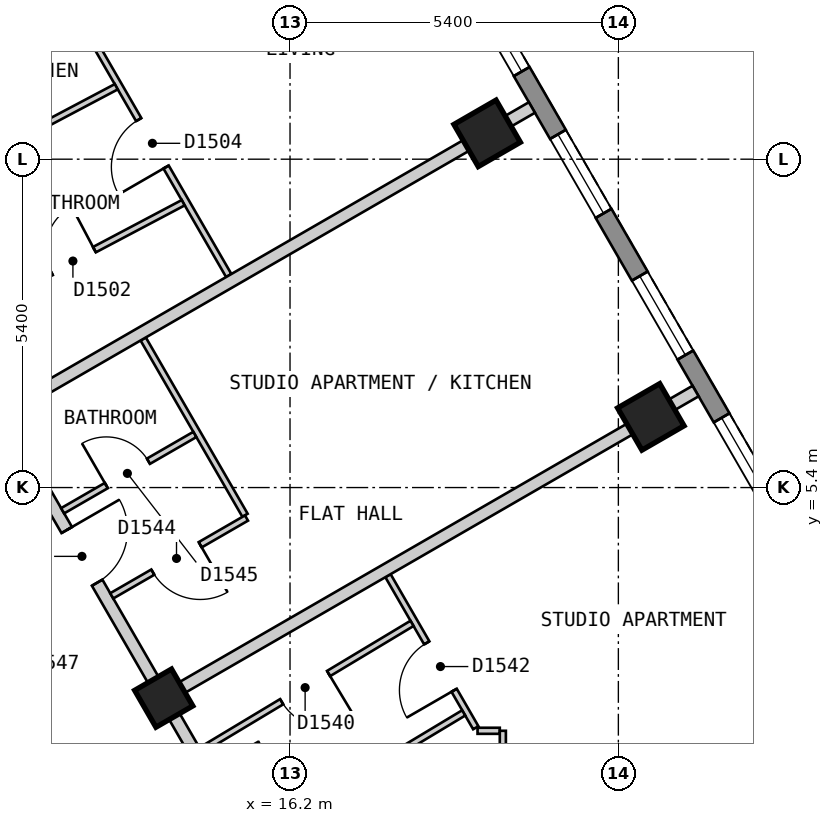
"""IFC4 building model, lengths in metres.
Left out: names, types, materials, properties, quantities, classifications, styles, units other than length and angle.
Written with IfcOpenShell. Run it as: python <this file> out.ifc"""

import sys

from ifc_helpers import new_model, si_unit, direction, frame, frame_2d, origin, origin_2d, place, context, subcontext, project, spatial, polyline, rectangle, outline, extrude, element, fill, save


model = new_model("IFC4")
c1 = context("Model", 3, precision=1e-05, world=origin(), true_north=direction((0.0, 1.0)))
c2 = subcontext(c1, "Body", "Model", "MODEL_VIEW")
j1 = project(units=[si_unit("LENGTHUNIT", "METRE"), si_unit("PLANEANGLEUNIT", "RADIAN")], contexts=[c1])
p1 = place(None, origin())
s1 = spatial("IfcSite", under=j1, at=p1, CompositionType="ELEMENT")
p2 = place(p1, origin())
s2 = spatial("IfcBuilding", under=s1, at=p2, CompositionType="ELEMENT")
p3 = place(p2, frame((0.0, 0.0, 190.2)))
s3 = spatial("IfcBuildingStorey", under=s2, at=p3, CompositionType="ELEMENT", Elevation=190.2)
for number, where, z_axis, x_axis in (
    (1, (22.134, 6.562, 0.0), (0.0, 0.0, 1.0), (-0.5, 0.866, 0.0)),
    (2, (19.442, 11.225, 0.0), (0.0, 0.0, 1.0), (-0.5, 0.866, 0.0)),
):
    element("IfcColumn", number, at=place(p3, frame(where, z_axis=z_axis, x_axis=x_axis)), inside=s3, PredefinedType="COLUMN", context=c2, shape_type="SweptSolid", body=[
        extrude(rectangle(XDim=0.8, YDim=0.8, at=origin_2d()), origin(), (0.0, 0.0, 1.0), 3.0),
    ])
p4 = place(p3, frame((14.123, 1.937, 0.0), z_axis=(0.0, 0.0, 1.0), x_axis=(-0.5, 0.866025403784, 0.0)))
e3 = element("IfcColumn", 3, at=p4, inside=s3, PredefinedType="COLUMN", context=c2, shape_type="SweptSolid", body=[
    extrude(rectangle(XDim=0.7, YDim=0.7, at=origin_2d()), origin(), (0.0, 0.0, 1.0), 3.0),
])
p5 = place(p3, frame((26.024, 1.825, 0.0), z_axis=(0.0, 0.0, 1.0), x_axis=(-0.500010537973, 0.866019319597, 0.0)))
e4 = element("IfcWall", 4, at=p5, inside=s3, PredefinedType="SOLIDWALL", context=c2, shape_type="SweptSolid", body=[
    extrude(outline(polyline([(0.0, -0.15), (22.863, -0.15), (22.783, 0.15), (0.08, 0.15), (0.0, -0.15)])), origin(), (0.0, 0.0, 1.0), 2.7),
])
p6 = place(p5, frame((1.259, 0.0, 0.15)))
e5 = element("IfcOpeningElement", 5, at=p6, cuts=e4, PredefinedType="OPENING", context=c2, shape_type="SweptSolid", body=[
    extrude(rectangle(XDim=1.5, YDim=2.1, at=frame_2d((0.75, 1.05))), frame((0.0, 0.16, 0.0), z_axis=(0.0, -1.0, 0.0), x_axis=(1.0, 0.0, 0.0)), (0.0, 0.0, 1.0), 0.32),
])
p7 = place(p5, frame((3.952, 0.0, 0.15)))
e6 = element("IfcOpeningElement", 6, at=p7, cuts=e4, PredefinedType="OPENING", context=c2, shape_type="SweptSolid", body=[
    extrude(rectangle(XDim=1.5, YDim=2.1, at=frame_2d((0.75, 1.05))), frame((0.0, 0.16, 0.0), z_axis=(0.0, -1.0, 0.0), x_axis=(1.0, 0.0, 0.0)), (0.0, 0.0, 1.0), 0.32),
])
p8 = place(p5, frame((6.644, 0.0, 0.15)))
e7 = element("IfcOpeningElement", 7, at=p8, cuts=e4, PredefinedType="OPENING", context=c2, shape_type="SweptSolid", body=[
    extrude(rectangle(XDim=1.5, YDim=2.1, at=frame_2d((0.75, 1.05))), frame((0.0, 0.16, 0.0), z_axis=(0.0, -1.0, 0.0), x_axis=(1.0, 0.0, 0.0)), (0.0, 0.0, 1.0), 0.32),
])
p9 = place(p5, frame((9.335, 0.0, 0.15)))
e8 = element("IfcOpeningElement", 8, at=p9, cuts=e4, PredefinedType="OPENING", context=c2, shape_type="SweptSolid", body=[
    extrude(rectangle(XDim=1.5, YDim=2.1, at=frame_2d((0.75, 1.05))), frame((0.0, 0.16, 0.0), z_axis=(0.0, -1.0, 0.0), x_axis=(1.0, 0.0, 0.0)), (0.0, 0.0, 1.0), 0.32),
])
p10 = place(p5, frame((12.028, 0.0, 0.15)))
e9 = element("IfcOpeningElement", 9, at=p10, cuts=e4, PredefinedType="OPENING", context=c2, shape_type="SweptSolid", body=[
    extrude(rectangle(XDim=1.5, YDim=2.1, at=frame_2d((0.75, 1.05))), frame((0.0, 0.16, 0.0), z_axis=(0.0, -1.0, 0.0), x_axis=(1.0, 0.0, 0.0)), (0.0, 0.0, 1.0), 0.32),
])
p11 = place(p5, frame((14.72, 0.0, 0.15)))
e10 = element("IfcOpeningElement", 10, at=p11, cuts=e4, PredefinedType="OPENING", context=c2, shape_type="SweptSolid", body=[
    extrude(rectangle(XDim=1.5, YDim=2.1, at=frame_2d((0.75, 1.05))), frame((0.0, 0.16, 0.0), z_axis=(0.0, -1.0, 0.0), x_axis=(1.0, 0.0, 0.0)), (0.0, 0.0, 1.0), 0.32),
])
p12 = place(p5, frame((17.411, 0.0, 0.15)))
e11 = element("IfcOpeningElement", 11, at=p12, cuts=e4, PredefinedType="OPENING", context=c2, shape_type="SweptSolid", body=[
    extrude(rectangle(XDim=1.5, YDim=2.1, at=frame_2d((0.75, 1.05))), frame((0.0, 0.16, 0.0), z_axis=(0.0, -1.0, 0.0), x_axis=(1.0, 0.0, 0.0)), (0.0, 0.0, 1.0), 0.32),
])
p13 = place(p5, frame((20.104, 0.0, 0.15)))
e12 = element("IfcOpeningElement", 12, at=p13, cuts=e4, PredefinedType="OPENING", context=c2, shape_type="SweptSolid", body=[
    extrude(rectangle(XDim=1.5, YDim=2.1, at=frame_2d((0.75, 1.05))), frame((0.0, 0.16, 0.0), z_axis=(0.0, -1.0, 0.0), x_axis=(1.0, 0.0, 0.0)), (0.0, 0.0, 1.0), 0.32),
])
p14 = place(p3, frame((9.469, 5.6, 0.0), z_axis=(0.0, 0.0, 1.0), x_axis=(0.499964524401, -0.866045884662, 0.0)))
e13 = element("IfcWall", 13, at=p14, inside=s3, PredefinedType="PARTITIONING", context=c2, shape_type="SweptSolid", body=[
    extrude(rectangle(XDim=7.042, YDim=0.2, at=frame_2d((3.521, 0.0))), origin(), (0.0, 0.0, 1.0), 2.7),
])
p15 = place(p14, frame((3.129, 0.0, 0.0)))
e14 = element("IfcOpeningElement", 14, at=p15, cuts=e13, PredefinedType="OPENING", context=c2, shape_type="SweptSolid", body=[
    extrude(rectangle(XDim=0.9, YDim=2.1, at=frame_2d((0.45, 1.05))), frame((0.0, 0.11, 0.0), z_axis=(0.0, -1.0, 0.0), x_axis=(1.0, 0.0, 0.0)), (0.0, 0.0, 1.0), 0.22),
])
p16 = place(p3, frame((10.739, 7.8, 0.0), z_axis=(0.0, 0.0, 1.0), x_axis=(0.500023726918, -0.866011704609, 0.0)))
e15 = element("IfcWall", 15, at=p16, inside=s3, PredefinedType="PARTITIONING", context=c2, shape_type="SweptSolid", body=[
    extrude(rectangle(XDim=9.47, YDim=0.2, at=frame_2d((4.735, 0.0))), origin(), (0.0, 0.0, 1.0), 2.7),
])
p17 = place(p16, frame((8.168, 0.0, 0.0)))
e16 = element("IfcOpeningElement", 16, at=p17, cuts=e15, PredefinedType="OPENING", context=c2, shape_type="SweptSolid", body=[
    extrude(rectangle(XDim=1.0, YDim=2.1, at=frame_2d((0.5, 1.05))), frame((0.0, 0.11, 0.0), z_axis=(0.0, -1.0, 0.0), x_axis=(1.0, 0.0, 0.0)), (0.0, 0.0, 1.0), 0.22),
])
p18 = place(p16, frame((3.578, 0.0, 0.0)))
e17 = element("IfcOpeningElement", 17, at=p18, cuts=e15, PredefinedType="OPENING", context=c2, shape_type="SweptSolid", body=[
    extrude(rectangle(XDim=1.0, YDim=2.1, at=frame_2d((0.5, 1.05))), frame((0.0, 0.11, 0.0), z_axis=(0.0, -1.0, 0.0), x_axis=(1.0, 0.0, 0.0)), (0.0, 0.0, 1.0), 0.22),
])
p19 = place(p3, frame((13.785, 7.844, 0.0), z_axis=(0.0, 0.0, 1.0), x_axis=(0.500176784828, -0.865923312955, 0.0)))
e18 = element("IfcWall", 18, at=p19, inside=s3, PredefinedType="PARTITIONING", context=c2, shape_type="SweptSolid", body=[
    extrude(rectangle(XDim=3.349, YDim=0.1, at=frame_2d((1.674, 0.0))), origin(), (0.0, 0.0, 1.0), 2.7),
])
p20 = place(p3, frame((17.811, 3.951, 0.0), z_axis=(0.0, 0.0, 1.0), x_axis=(0.499976149225, -0.866039173598, 0.0)))
e19 = element("IfcWall", 19, at=p20, inside=s3, PredefinedType="PARTITIONING", context=c2, shape_type="SweptSolid", body=[
    extrude(rectangle(XDim=2.888, YDim=0.1, at=frame_2d((1.444, 0.0))), origin(), (0.0, 0.0, 1.0), 2.7),
])
p21 = place(p20, frame((1.276, 0.0, 0.0)))
e20 = element("IfcOpeningElement", 20, at=p21, cuts=e19, PredefinedType="OPENING", context=c2, shape_type="SweptSolid", body=[
    extrude(rectangle(XDim=0.9, YDim=2.1, at=frame_2d((0.45, 1.05))), frame((0.0, 0.06, 0.0), z_axis=(0.0, -1.0, 0.0), x_axis=(1.0, 0.0, 0.0)), (0.0, 0.0, 1.0), 0.12),
])
p22 = place(p3, frame((9.883, 18.082, 0.0), z_axis=(0.0, 0.0, 1.0), x_axis=(0.500004428835, -0.86602284678, 0.0)))
e21 = element("IfcWall", 21, at=p22, inside=s3, PredefinedType="PARTITIONING", context=c2, shape_type="SweptSolid", body=[
    extrude(rectangle(XDim=10.618, YDim=0.1, at=frame_2d((5.309, 0.0))), origin(), (0.0, 0.0, 1.0), 2.7),
])
p23 = place(p22, frame((7.657, 0.0, 0.0)))
e22 = element("IfcOpeningElement", 22, at=p23, cuts=e21, PredefinedType="OPENING", context=c2, shape_type="SweptSolid", body=[
    extrude(rectangle(XDim=0.9, YDim=2.1, at=frame_2d((0.45, 1.05))), frame((0.0, 0.06, 0.0), z_axis=(0.0, -1.0, 0.0), x_axis=(1.0, 0.0, 0.0)), (0.0, 0.0, 1.0), 0.12),
])
p24 = place(p22, frame((2.242, 0.0, 0.0)))
e23 = element("IfcOpeningElement", 23, at=p24, cuts=e21, PredefinedType="OPENING", context=c2, shape_type="SweptSolid", body=[
    extrude(rectangle(XDim=0.8, YDim=2.1, at=frame_2d((0.4, 1.05))), frame((0.0, 0.06, 0.0), z_axis=(0.0, -1.0, 0.0), x_axis=(1.0, 0.0, 0.0)), (0.0, 0.0, 1.0), 0.12),
])
p25 = place(p3, frame((19.284, 1.4, 0.0), z_axis=(0.0, 0.0, 1.0), x_axis=(1.0, 0.0, 0.0)))
e24 = element("IfcWall", 24, at=p25, inside=s3, PredefinedType="PARTITIONING", context=c2, shape_type="SweptSolid", body=[
    extrude(rectangle(XDim=0.366, YDim=0.1, at=frame_2d((0.183, 0.0))), origin(), (0.0, 0.0, 1.0), 2.7),
])
p26 = place(p3, frame((19.7, 0.679, 0.0), z_axis=(0.0, 0.0, 1.0), x_axis=(0.0, 1.0, 0.0)))
e25 = element("IfcWall", 25, at=p26, inside=s3, PredefinedType="PARTITIONING", context=c2, shape_type="SweptSolid", body=[
    extrude(rectangle(XDim=0.721, YDim=0.1, at=frame_2d((0.36, 0.0))), origin(), (0.0, 0.0, 1.0), 2.7),
])
p27 = place(p3, frame((9.76, 10.096, 0.0), z_axis=(0.0, 0.0, 1.0), x_axis=(0.883925629136, 0.467627503636, 0.0)))
e26 = element("IfcWall", 26, at=p27, inside=s3, PredefinedType="PARTITIONING", context=c2, shape_type="SweptSolid", body=[
    extrude(rectangle(XDim=4.052, YDim=0.1, at=frame_2d((2.026, 0.0))), origin(), (0.0, 0.0, 1.0), 2.7),
])
p28 = place(p27, frame((1.551, 0.0, 0.0)))
e27 = element("IfcOpeningElement", 27, at=p28, cuts=e26, PredefinedType="OPENING", context=c2, shape_type="SweptSolid", body=[
    extrude(rectangle(XDim=0.9, YDim=2.1, at=frame_2d((0.45, 1.05))), frame((0.0, 0.06, 0.0), z_axis=(0.0, -1.0, 0.0), x_axis=(1.0, 0.0, 0.0)), (0.0, 0.0, 1.0), 0.12),
])
p29 = place(p3, frame((10.772, 8.143, 0.0), z_axis=(0.0, 0.0, 1.0), x_axis=(0.884049480227, 0.467393320995, 0.0)))
e28 = element("IfcWall", 28, at=p29, inside=s3, PredefinedType="PARTITIONING", context=c2, shape_type="SweptSolid", body=[
    extrude(rectangle(XDim=4.153, YDim=0.1, at=frame_2d((2.076, 0.0))), origin(), (0.0, 0.0, 1.0), 2.7),
])
p30 = place(p29, frame((1.701, 0.0, 0.0)))
e29 = element("IfcOpeningElement", 29, at=p30, cuts=e28, PredefinedType="OPENING", context=c2, shape_type="SweptSolid", body=[
    extrude(rectangle(XDim=0.8, YDim=2.1, at=frame_2d((0.4, 1.05))), frame((0.0, 0.06, 0.0), z_axis=(0.0, -1.0, 0.0), x_axis=(1.0, 0.0, 0.0)), (0.0, 0.0, 1.0), 0.12),
])
p31 = place(p3, frame((13.268, 3.619, 0.0), z_axis=(0.0, 0.0, 1.0), x_axis=(0.865902724456, 0.500212426655, 0.0)))
e30 = element("IfcWall", 30, at=p31, inside=s3, PredefinedType="PARTITIONING", context=c2, shape_type="SweptSolid", body=[
    extrude(rectangle(XDim=2.559, YDim=0.1, at=frame_2d((1.28, 0.0))), origin(), (0.0, 0.0, 1.0), 2.7),
])
p32 = place(p31, frame((0.78, 0.0, 0.0)))
e31 = element("IfcOpeningElement", 31, at=p32, cuts=e30, PredefinedType="OPENING", context=c2, shape_type="SweptSolid", body=[
    extrude(rectangle(XDim=0.9, YDim=2.1, at=frame_2d((0.45, 1.05))), frame((0.0, 0.06, 0.0), z_axis=(0.0, -1.0, 0.0), x_axis=(1.0, 0.0, 0.0)), (0.0, 0.0, 1.0), 0.12),
])
p33 = place(p3, frame((12.46, 5.018, 0.0), z_axis=(0.0, 0.0, 1.0), x_axis=(0.866080321209, 0.499904868165, 0.0)))
e32 = element("IfcWall", 32, at=p33, inside=s3, PredefinedType="PARTITIONING", context=c2, shape_type="SweptSolid", body=[
    extrude(rectangle(XDim=2.51, YDim=0.1, at=frame_2d((1.255, 0.0))), origin(), (0.0, 0.0, 1.0), 2.7),
])
p34 = place(p33, frame((0.83, 0.0, 0.0)))
e33 = element("IfcOpeningElement", 33, at=p34, cuts=e32, PredefinedType="OPENING", context=c2, shape_type="SweptSolid", body=[
    extrude(rectangle(XDim=0.8, YDim=2.1, at=frame_2d((0.4, 1.05))), frame((0.0, 0.06, 0.0), z_axis=(0.0, -1.0, 0.0), x_axis=(1.0, 0.0, 0.0)), (0.0, 0.0, 1.0), 0.12),
])
p35 = place(p3, frame((8.999, 11.413, 0.0), z_axis=(0.0, 0.0, 1.0), x_axis=(0.86606561423, 0.499930346997, 0.0)))
e34 = element("IfcWall", 34, at=p35, inside=s3, PredefinedType="PARTITIONING", context=c2, shape_type="SweptSolid", body=[
    extrude(rectangle(XDim=4.1, YDim=0.1, at=frame_2d((2.05, 0.0))), origin(), (0.0, 0.0, 1.0), 2.7),
])
p36 = place(p3, frame((14.734, 1.08, 0.0), z_axis=(0.0, 0.0, 1.0), x_axis=(0.857205608004, 0.514974315482, 0.0)))
e35 = element("IfcWall", 35, at=p36, inside=s3, PredefinedType="PARTITIONING", context=c2, shape_type="SweptSolid", body=[
    extrude(rectangle(XDim=4.051, YDim=0.1, at=frame_2d((2.025, 0.0))), origin(), (0.0, 0.0, 1.0), 2.7),
])
p37 = place(p36, frame((1.55, 0.0, 0.0)))
e36 = element("IfcOpeningElement", 36, at=p37, cuts=e35, PredefinedType="OPENING", context=c2, shape_type="SweptSolid", body=[
    extrude(rectangle(XDim=0.9, YDim=2.1, at=frame_2d((0.45, 1.05))), frame((0.0, 0.06, 0.0), z_axis=(0.0, -1.0, 0.0), x_axis=(1.0, 0.0, 0.0)), (0.0, 0.0, 1.0), 0.12),
])
p38 = place(p3, frame((15.499, -0.444, 0.0), z_axis=(0.0, 0.0, 1.0), x_axis=(0.857061798163, 0.515213619899, 0.0)))
e37 = element("IfcWall", 37, at=p38, inside=s3, PredefinedType="PARTITIONING", context=c2, shape_type="SweptSolid", body=[
    extrude(rectangle(XDim=4.15, YDim=0.1, at=frame_2d((2.075, 0.0))), origin(), (0.0, 0.0, 1.0), 2.7),
])
p39 = place(p38, frame((1.7, 0.0, 0.0)))
e38 = element("IfcOpeningElement", 38, at=p39, cuts=e37, PredefinedType="OPENING", context=c2, shape_type="SweptSolid", body=[
    extrude(rectangle(XDim=0.8, YDim=2.1, at=frame_2d((0.4, 1.05))), frame((0.0, 0.06, 0.0), z_axis=(0.0, -1.0, 0.0), x_axis=(1.0, 0.0, 0.0)), (0.0, 0.0, 1.0), 0.12),
])
p40 = place(p3, frame((14.21, 1.987, 0.0), z_axis=(0.0, 0.0, 1.0), x_axis=(0.866022959057, 0.500004234368, 0.0)))
e39 = element("IfcWall", 39, at=p40, inside=s3, PredefinedType="PARTITIONING", context=c2, shape_type="SweptSolid", body=[
    extrude(rectangle(XDim=10.0, YDim=0.2, at=frame_2d((5.0, 0.0))), origin(), (0.0, 0.0, 1.0), 2.7),
])
p41 = place(p3, frame((11.518, 6.65, 0.0), z_axis=(0.0, 0.0, 1.0), x_axis=(0.866016855193, 0.500014806302, 0.0)))
e40 = element("IfcWall", 40, at=p41, inside=s3, PredefinedType="PARTITIONING", context=c2, shape_type="SweptSolid", body=[
    extrude(rectangle(XDim=10.0, YDim=0.2, at=frame_2d((5.0, 0.0))), origin(), (0.0, 0.0, 1.0), 2.7),
])
p42 = place(p7, origin())
e41 = element("IfcWindow", 41, at=p42, inside=s3, PartitioningType="SINGLE_PANEL", PredefinedType="WINDOW", context=c2, shape_type="SweptSolid", body=[
    extrude(rectangle(XDim=1.5, YDim=2.1, at=frame_2d((0.75, 1.05))), frame((0.0, 0.03, 0.0), z_axis=(0.0, -1.0, 0.0), x_axis=(1.0, 0.0, 0.0)), (0.0, 0.0, 1.0), 0.06),
])
fill(e6, e41)
p43 = place(p8, origin())
e42 = element("IfcWindow", 42, at=p43, inside=s3, PartitioningType="SINGLE_PANEL", PredefinedType="WINDOW", context=c2, shape_type="SweptSolid", body=[
    extrude(rectangle(XDim=1.5, YDim=2.1, at=frame_2d((0.75, 1.05))), frame((0.0, 0.03, 0.0), z_axis=(0.0, -1.0, 0.0), x_axis=(1.0, 0.0, 0.0)), (0.0, 0.0, 1.0), 0.06),
])
fill(e7, e42)
p44 = place(p9, origin())
e43 = element("IfcWindow", 43, at=p44, inside=s3, PartitioningType="SINGLE_PANEL", PredefinedType="WINDOW", context=c2, shape_type="SweptSolid", body=[
    extrude(rectangle(XDim=1.5, YDim=2.1, at=frame_2d((0.75, 1.05))), frame((0.0, 0.03, 0.0), z_axis=(0.0, -1.0, 0.0), x_axis=(1.0, 0.0, 0.0)), (0.0, 0.0, 1.0), 0.06),
])
fill(e8, e43)
p45 = place(p10, origin())
e44 = element("IfcWindow", 44, at=p45, inside=s3, PartitioningType="SINGLE_PANEL", PredefinedType="WINDOW", context=c2, shape_type="SweptSolid", body=[
    extrude(rectangle(XDim=1.5, YDim=2.1, at=frame_2d((0.75, 1.05))), frame((0.0, 0.03, 0.0), z_axis=(0.0, -1.0, 0.0), x_axis=(1.0, 0.0, 0.0)), (0.0, 0.0, 1.0), 0.06),
])
fill(e9, e44)
p46 = place(p30, origin())
e45 = element("IfcDoor", 45, at=p46, inside=s3, OperationType="SINGLE_SWING_RIGHT", PredefinedType="DOOR", context=c2, shape_type="SweptSolid", body=[
    extrude(rectangle(XDim=0.8, YDim=2.1, at=frame_2d((0.4, 1.05))), frame((0.0, 0.025, 0.0), z_axis=(0.0, -1.0, 0.0), x_axis=(1.0, 0.0, 0.0)), (0.0, 0.0, 1.0), 0.05),
])
fill(e29, e45)
p47 = place(p23, origin())
e46 = element("IfcDoor", 46, at=p47, inside=s3, OperationType="SINGLE_SWING_RIGHT", PredefinedType="DOOR", context=c2, shape_type="SweptSolid", body=[
    extrude(rectangle(XDim=0.9, YDim=2.1, at=frame_2d((0.45, 1.05))), frame((0.0, 0.025, 0.0), z_axis=(0.0, -1.0, 0.0), x_axis=(1.0, 0.0, 0.0)), (0.0, 0.0, 1.0), 0.05),
])
fill(e22, e46)
p48 = place(p37, origin())
e47 = element("IfcDoor", 47, at=p48, inside=s3, OperationType="SINGLE_SWING_RIGHT", PredefinedType="DOOR", context=c2, shape_type="SweptSolid", body=[
    extrude(rectangle(XDim=0.9, YDim=2.1, at=frame_2d((0.45, 1.05))), frame((0.0, 0.025, 0.0), z_axis=(0.0, -1.0, 0.0), x_axis=(1.0, 0.0, 0.0)), (0.0, 0.0, 1.0), 0.05),
])
fill(e36, e47)
p49 = place(p21, origin())
e48 = element("IfcDoor", 48, at=p49, inside=s3, OperationType="SINGLE_SWING_RIGHT", PredefinedType="DOOR", context=c2, shape_type="SweptSolid", body=[
    extrude(rectangle(XDim=0.9, YDim=2.1, at=frame_2d((0.45, 1.05))), frame((0.0, 0.025, 0.0), z_axis=(0.0, -1.0, 0.0), x_axis=(1.0, 0.0, 0.0)), (0.0, 0.0, 1.0), 0.05),
])
fill(e20, e48)
p50 = place(p18, origin())
e49 = element("IfcDoor", 49, at=p50, inside=s3, OperationType="SINGLE_SWING_LEFT", PredefinedType="DOOR", context=c2, shape_type="SweptSolid", body=[
    extrude(rectangle(XDim=1.0, YDim=2.1, at=frame_2d((0.5, 1.05))), frame((0.0, 0.025, 0.0), z_axis=(0.0, -1.0, 0.0), x_axis=(1.0, 0.0, 0.0)), (0.0, 0.0, 1.0), 0.05),
])
fill(e17, e49)
p51 = place(p32, origin())
e50 = element("IfcDoor", 50, at=p51, inside=s3, OperationType="SINGLE_SWING_RIGHT", PredefinedType="DOOR", context=c2, shape_type="SweptSolid", body=[
    extrude(rectangle(XDim=0.9, YDim=2.1, at=frame_2d((0.45, 1.05))), frame((0.0, 0.025, 0.0), z_axis=(0.0, -1.0, 0.0), x_axis=(1.0, 0.0, 0.0)), (0.0, 0.0, 1.0), 0.05),
])
fill(e31, e50)
p52 = place(p34, origin())
e51 = element("IfcDoor", 51, at=p52, inside=s3, OperationType="SINGLE_SWING_LEFT", PredefinedType="DOOR", context=c2, shape_type="SweptSolid", body=[
    extrude(rectangle(XDim=0.8, YDim=2.1, at=frame_2d((0.4, 1.05))), frame((0.0, 0.025, 0.0), z_axis=(0.0, -1.0, 0.0), x_axis=(1.0, 0.0, 0.0)), (0.0, 0.0, 1.0), 0.05),
])
fill(e33, e51)
save(model, sys.argv[1])
